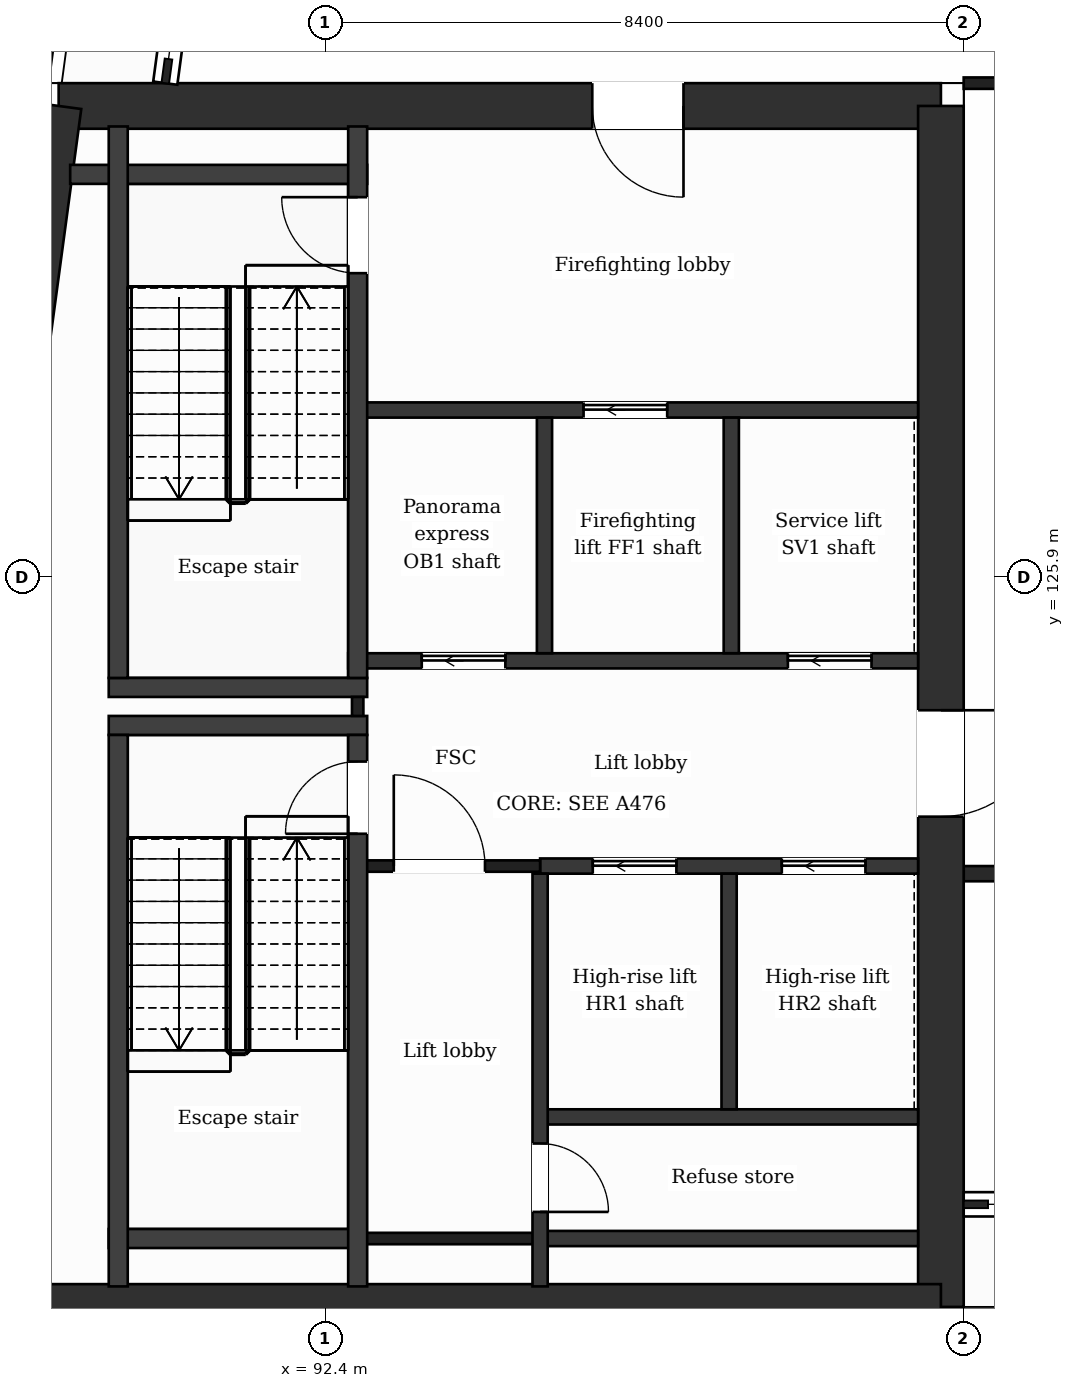
"""IFC4 building model, lengths in metres.
Left out: names, types, materials, properties, quantities, classifications, styles, units other than length and angle.
Written with IfcOpenShell. Run it as: python <this file> out.ifc"""

import sys

from ifc_helpers import new_model, si_unit, direction, frame, frame_2d, origin, place, context, subcontext, project, spatial, rectangle, extrude, element, fill, save


model = new_model("IFC4")
c1 = context("Model", 3, precision=1e-05, world=origin(), true_north=direction((0.0, 1.0)))
c2 = subcontext(c1, "Body", "Model", "MODEL_VIEW")
j1 = project(units=[si_unit("LENGTHUNIT", "METRE"), si_unit("PLANEANGLEUNIT", "RADIAN")], contexts=[c1])
p1 = place(None, origin())
s1 = spatial("IfcSite", under=j1, at=p1, CompositionType="ELEMENT")
p2 = place(p1, origin())
s2 = spatial("IfcBuilding", under=s1, at=p2, CompositionType="ELEMENT")
p3 = place(p2, frame((0.0, 0.0, 307.9)))
s3 = spatial("IfcBuildingStorey", under=s2, at=p3, CompositionType="ELEMENT", Elevation=307.9)
p4 = place(p3, frame((88.893, 132.1, 0.0), z_axis=(0.0, 0.0, 1.0), x_axis=(1.0, 0.0, 0.0)))
e1 = element("IfcWall", 1, at=p4, inside=s3, PredefinedType="SHEAR", context=c2, shape_type="SweptSolid", body=[
    extrude(rectangle(XDim=11.607, YDim=0.6, at=frame_2d((5.803, 0.0))), origin(), (0.0, 0.0, 1.0), 7.5),
])
p5 = place(p4, frame((7.021, 0.0, 0.0)))
e2 = element("IfcOpeningElement", 2, at=p5, cuts=e1, PredefinedType="OPENING", context=c2, shape_type="SweptSolid", body=[
    extrude(rectangle(XDim=1.2, YDim=2.1, at=frame_2d((0.6, 1.05))), frame((0.0, 0.31, 0.0), z_axis=(0.0, -1.0, 0.0), x_axis=(1.0, 0.0, 0.0)), (0.0, 0.0, 1.0), 0.62),
])
p6 = place(p3, frame((100.5, 132.1, 0.0), z_axis=(0.0, 0.0, 1.0), x_axis=(0.0, -1.0, 0.0)))
e3 = element("IfcWall", 3, at=p6, inside=s3, PredefinedType="SHEAR", context=c2, shape_type="SweptSolid", body=[
    extrude(rectangle(XDim=15.8, YDim=0.6, at=frame_2d((7.9, 0.0))), origin(), (0.0, 0.0, 1.0), 7.5),
])
p7 = place(p6, frame((7.95, 0.0, 0.0)))
e4 = element("IfcOpeningElement", 4, at=p7, cuts=e3, PredefinedType="OPENING", context=c2, shape_type="SweptSolid", body=[
    extrude(rectangle(XDim=1.4, YDim=2.1, at=frame_2d((0.7, 1.05))), frame((0.0, 0.31, 0.0), z_axis=(0.0, -1.0, 0.0), x_axis=(1.0, 0.0, 0.0)), (0.0, 0.0, 1.0), 0.62),
])
p8 = place(p3, frame((100.5, 116.3, 0.0), z_axis=(0.0, 0.0, 1.0), x_axis=(-1.0, 0.0, 0.0)))
e5 = element("IfcWall", 5, at=p8, inside=s3, PredefinedType="SHEAR", context=c2, shape_type="SweptSolid", body=[
    extrude(rectangle(XDim=13.734, YDim=0.6, at=frame_2d((6.867, 0.0))), origin(), (0.0, 0.0, 1.0), 7.5),
])
p9 = place(p3, frame((86.766, 116.3, 0.0), z_axis=(0.0, 0.0, 1.0), x_axis=(0.13341345841, 0.991060466932, 0.0)))
e6 = element("IfcWall", 6, at=p9, inside=s3, PredefinedType="SHEAR", context=c2, shape_type="SweptSolid", body=[
    extrude(rectangle(XDim=15.943, YDim=0.6, at=frame_2d((7.971, 0.0))), origin(), (0.0, 0.0, 1.0), 7.5),
])
p10 = place(p3, frame((95.227, 117.2, 0.0), z_axis=(0.0, 0.0, 1.0), x_axis=(1.0, 0.0, 0.0)))
e7 = element("IfcWall", 7, at=p10, inside=s3, PredefinedType="PARTITIONING", context=c2, shape_type="SweptSolid", body=[
    extrude(rectangle(XDim=4.973, YDim=0.2, at=frame_2d((2.486, 0.0))), origin(), (0.0, 0.0, 1.0), 7.05),
])
p11 = place(p3, frame((92.827, 117.2, 0.0), z_axis=(0.0, 0.0, 1.0), x_axis=(1.0, 0.0, 0.0)))
e8 = element("IfcWall", 8, at=p11, inside=s3, PredefinedType="PARTITIONING", context=c2, shape_type="SweptSolid", body=[
    extrude(rectangle(XDim=2.4, YDim=0.15, at=frame_2d((1.2, 0.0))), origin(), (0.0, 0.0, 1.0), 7.05),
])
p12 = place(p3, frame((89.552, 117.2, 0.0), z_axis=(0.0, 0.0, 1.0), x_axis=(1.0, 0.0, 0.0)))
e9 = element("IfcWall", 9, at=p12, inside=s3, PredefinedType="PARTITIONING", context=c2, shape_type="SweptSolid", body=[
    extrude(rectangle(XDim=3.275, YDim=0.25, at=frame_2d((1.637, 0.0))), origin(), (0.0, 0.0, 1.0), 7.05),
])
p13 = place(p3, frame((95.227, 118.8, 0.0), z_axis=(0.0, 0.0, 1.0), x_axis=(1.0, 0.0, 0.0)))
e10 = element("IfcWall", 10, at=p13, inside=s3, PredefinedType="PARTITIONING", context=c2, shape_type="SweptSolid", body=[
    extrude(rectangle(XDim=4.973, YDim=0.2, at=frame_2d((2.486, 0.0))), origin(), (0.0, 0.0, 1.0), 7.05),
])
p14 = place(p3, frame((100.8, 122.0, 0.0), z_axis=(0.0, 0.0, 1.0), x_axis=(1.0, 0.0, 0.0)))
e11 = element("IfcWall", 11, at=p14, inside=s3, PredefinedType="PARTITIONING", context=c2, shape_type="SweptSolid", body=[
    extrude(rectangle(XDim=8.5, YDim=0.2, at=frame_2d((4.25, 0.0))), origin(), (0.0, 0.0, 1.0), 7.05),
])
p15 = place(p3, frame((95.227, 122.1, 0.0), z_axis=(0.0, 0.0, 1.0), x_axis=(1.0, 0.0, 0.0)))
e12 = element("IfcWall", 12, at=p15, inside=s3, PredefinedType="PARTITIONING", context=c2, shape_type="SweptSolid", body=[
    extrude(rectangle(XDim=4.973, YDim=0.2, at=frame_2d((2.486, 0.0))), origin(), (0.0, 0.0, 1.0), 7.05),
])
p16 = place(p15, frame((0.693, 0.0, 0.0)))
e13 = element("IfcOpeningElement", 13, at=p16, cuts=e12, PredefinedType="OPENING", context=c2, shape_type="SweptSolid", body=[
    extrude(rectangle(XDim=1.1, YDim=2.1, at=frame_2d((0.55, 1.05))), frame((0.0, 0.11, 0.0), z_axis=(0.0, -1.0, 0.0), x_axis=(1.0, 0.0, 0.0)), (0.0, 0.0, 1.0), 0.22),
])
p17 = place(p15, frame((3.18, 0.0, 0.0)))
e14 = element("IfcOpeningElement", 14, at=p17, cuts=e12, PredefinedType="OPENING", context=c2, shape_type="SweptSolid", body=[
    extrude(rectangle(XDim=1.1, YDim=2.1, at=frame_2d((0.55, 1.05))), frame((0.0, 0.11, 0.0), z_axis=(0.0, -1.0, 0.0), x_axis=(1.0, 0.0, 0.0)), (0.0, 0.0, 1.0), 0.22),
])
p18 = place(p3, frame((92.827, 122.1, 0.0), z_axis=(0.0, 0.0, 1.0), x_axis=(1.0, 0.0, 0.0)))
e15 = element("IfcWall", 15, at=p18, inside=s3, PredefinedType="PARTITIONING", context=c2, shape_type="SweptSolid", body=[
    extrude(rectangle(XDim=2.4, YDim=0.15, at=frame_2d((1.2, 0.0))), origin(), (0.0, 0.0, 1.0), 7.05),
])
p19 = place(p18, frame((0.475, 0.0, 0.0)))
e16 = element("IfcOpeningElement", 16, at=p19, cuts=e15, PredefinedType="OPENING", context=c2, shape_type="SweptSolid", body=[
    extrude(rectangle(XDim=1.2, YDim=2.1, at=frame_2d((0.6, 1.05))), frame((0.0, 0.085, 0.0), z_axis=(0.0, -1.0, 0.0), x_axis=(1.0, 0.0, 0.0)), (0.0, 0.0, 1.0), 0.17),
])
for number, where, z_axis, x_axis in (
    (17, (89.552, 123.95, 0.0), (0.0, 0.0, 1.0), (1.0, 0.0, 0.0)),
    (18, (89.552, 124.45, 0.0), (0.0, 0.0, 1.0), (1.0, 0.0, 0.0)),
):
    element("IfcWall", number, at=place(p3, frame(where, z_axis=z_axis, x_axis=x_axis)), inside=s3, PredefinedType="PARTITIONING", context=c2, shape_type="SweptSolid", body=[
        extrude(rectangle(XDim=3.4, YDim=0.25, at=frame_2d((1.7, 0.0))), origin(), (0.0, 0.0, 1.0), 7.05),
    ])
p20 = place(p3, frame((92.702, 124.8, 0.0), z_axis=(0.0, 0.0, 1.0), x_axis=(1.0, 0.0, 0.0)))
e19 = element("IfcWall", 19, at=p20, inside=s3, PredefinedType="PARTITIONING", context=c2, shape_type="SweptSolid", body=[
    extrude(rectangle(XDim=7.498, YDim=0.2, at=frame_2d((3.749, 0.0))), origin(), (0.0, 0.0, 1.0), 7.05),
])
p21 = place(p20, frame((0.968, 0.0, 0.0)))
e20 = element("IfcOpeningElement", 20, at=p21, cuts=e19, PredefinedType="OPENING", context=c2, shape_type="SweptSolid", body=[
    extrude(rectangle(XDim=1.1, YDim=2.1, at=frame_2d((0.55, 1.05))), frame((0.0, 0.11, 0.0), z_axis=(0.0, -1.0, 0.0), x_axis=(1.0, 0.0, 0.0)), (0.0, 0.0, 1.0), 0.22),
])
p22 = place(p20, frame((5.785, 0.0, 0.0)))
e21 = element("IfcOpeningElement", 21, at=p22, cuts=e19, PredefinedType="OPENING", context=c2, shape_type="SweptSolid", body=[
    extrude(rectangle(XDim=1.1, YDim=2.1, at=frame_2d((0.55, 1.05))), frame((0.0, 0.11, 0.0), z_axis=(0.0, -1.0, 0.0), x_axis=(1.0, 0.0, 0.0)), (0.0, 0.0, 1.0), 0.22),
])
p23 = place(p3, frame((92.827, 128.1, 0.0), z_axis=(0.0, 0.0, 1.0), x_axis=(1.0, 0.0, 0.0)))
e22 = element("IfcWall", 22, at=p23, inside=s3, PredefinedType="PARTITIONING", context=c2, shape_type="SweptSolid", body=[
    extrude(rectangle(XDim=7.373, YDim=0.2, at=frame_2d((3.687, 0.0))), origin(), (0.0, 0.0, 1.0), 7.05),
])
p24 = place(p23, frame((2.972, 0.0, 0.0)))
e23 = element("IfcOpeningElement", 23, at=p24, cuts=e22, PredefinedType="OPENING", context=c2, shape_type="SweptSolid", body=[
    extrude(rectangle(XDim=1.1, YDim=2.1, at=frame_2d((0.55, 1.05))), frame((0.0, 0.11, 0.0), z_axis=(0.0, -1.0, 0.0), x_axis=(1.0, 0.0, 0.0)), (0.0, 0.0, 1.0), 0.22),
])
p25 = place(p3, frame((89.045, 131.2, 0.0), z_axis=(0.0, 0.0, 1.0), x_axis=(1.0, 0.0, 0.0)))
e24 = element("IfcWall", 24, at=p25, inside=s3, PredefinedType="PARTITIONING", context=c2, shape_type="SweptSolid", body=[
    extrude(rectangle(XDim=3.907, YDim=0.25, at=frame_2d((1.954, 0.0))), origin(), (0.0, 0.0, 1.0), 7.05),
])
p26 = place(p3, frame((100.8, 132.4, 0.0), z_axis=(0.0, 0.0, 1.0), x_axis=(1.0, 0.0, 0.0)))
e25 = element("IfcWall", 25, at=p26, inside=s3, PredefinedType="PARTITIONING", context=c2, shape_type="SweptSolid", body=[
    extrude(rectangle(XDim=25.2, YDim=0.15, at=frame_2d((12.6, 0.0))), origin(), (0.0, 0.0, 1.0), 7.05),
])
p27 = place(p26, frame((9.28, 0.0, 0.0)))
e26 = element("IfcOpeningElement", 26, at=p27, cuts=e25, PredefinedType="OPENING", context=c2, shape_type="SweptSolid", body=[
    extrude(rectangle(XDim=2.4, YDim=2.1, at=frame_2d((1.2, 1.05))), frame((0.0, 0.085, 0.0), z_axis=(0.0, -1.0, 0.0), x_axis=(1.0, 0.0, 0.0)), (0.0, 0.0, 1.0), 0.17),
])
p28 = place(p26, frame((13.52, 0.0, 0.0)))
e27 = element("IfcOpeningElement", 27, at=p28, cuts=e25, PredefinedType="OPENING", context=c2, shape_type="SweptSolid", body=[
    extrude(rectangle(XDim=2.4, YDim=2.1, at=frame_2d((1.2, 1.05))), frame((0.0, 0.085, 0.0), z_axis=(0.0, -1.0, 0.0), x_axis=(1.0, 0.0, 0.0)), (0.0, 0.0, 1.0), 0.17),
])
p29 = place(p3, frame((89.677, 116.57, 0.0), z_axis=(0.0, 0.0, 1.0), x_axis=(0.0, 1.0, 0.0)))
e28 = element("IfcWall", 28, at=p29, inside=s3, PredefinedType="PARTITIONING", context=c2, shape_type="SweptSolid", body=[
    extrude(rectangle(XDim=7.255, YDim=0.25, at=frame_2d((3.627, 0.0))), origin(), (0.0, 0.0, 1.0), 7.05),
])
p30 = place(p3, frame((89.677, 124.575, 0.0), z_axis=(0.0, 0.0, 1.0), x_axis=(0.0, 1.0, 0.0)))
e29 = element("IfcWall", 29, at=p30, inside=s3, PredefinedType="PARTITIONING", context=c2, shape_type="SweptSolid", body=[
    extrude(rectangle(XDim=7.255, YDim=0.25, at=frame_2d((3.627, 0.0))), origin(), (0.0, 0.0, 1.0), 7.05),
])
p31 = place(p3, frame((92.827, 124.075, 0.0), z_axis=(0.0, 0.0, 1.0), x_axis=(0.0, 1.0, 0.0)))
e30 = element("IfcWall", 30, at=p31, inside=s3, PredefinedType="PARTITIONING", context=c2, shape_type="SweptSolid", body=[
    extrude(rectangle(XDim=0.25, YDim=0.15, at=frame_2d((0.125, 0.0))), origin(), (0.0, 0.0, 1.0), 7.05),
])
p32 = place(p3, frame((92.827, 116.57, 0.0), z_axis=(0.0, 0.0, 1.0), x_axis=(0.0, 1.0, 0.0)))
e31 = element("IfcWall", 31, at=p32, inside=s3, PredefinedType="PARTITIONING", context=c2, shape_type="SweptSolid", body=[
    extrude(rectangle(XDim=7.255, YDim=0.25, at=frame_2d((3.627, 0.0))), origin(), (0.0, 0.0, 1.0), 7.05),
])
p33 = place(p32, frame((5.955, 0.0, 0.0)))
e32 = element("IfcOpeningElement", 32, at=p33, cuts=e31, PredefinedType="OPENING", context=c2, shape_type="SweptSolid", body=[
    extrude(rectangle(XDim=0.95, YDim=2.1, at=frame_2d((0.475, 1.05))), frame((0.0, 0.135, 0.0), z_axis=(0.0, -1.0, 0.0), x_axis=(1.0, 0.0, 0.0)), (0.0, 0.0, 1.0), 0.27),
])
p34 = place(p3, frame((92.827, 124.575, 0.0), z_axis=(0.0, 0.0, 1.0), x_axis=(0.0, 1.0, 0.0)))
e33 = element("IfcWall", 33, at=p34, inside=s3, PredefinedType="PARTITIONING", context=c2, shape_type="SweptSolid", body=[
    extrude(rectangle(XDim=7.255, YDim=0.25, at=frame_2d((3.627, 0.0))), origin(), (0.0, 0.0, 1.0), 7.05),
])
p35 = place(p34, frame((5.325, 0.0, 0.0)))
e34 = element("IfcOpeningElement", 34, at=p35, cuts=e33, PredefinedType="OPENING", context=c2, shape_type="SweptSolid", body=[
    extrude(rectangle(XDim=1.0, YDim=2.1, at=frame_2d((0.5, 1.05))), frame((0.0, 0.135, 0.0), z_axis=(0.0, -1.0, 0.0), x_axis=(1.0, 0.0, 0.0)), (0.0, 0.0, 1.0), 0.27),
])
p36 = place(p3, frame((95.227, 116.57, 0.0), z_axis=(0.0, 0.0, 1.0), x_axis=(0.0, 1.0, 0.0)))
e35 = element("IfcWall", 35, at=p36, inside=s3, PredefinedType="PARTITIONING", context=c2, shape_type="SweptSolid", body=[
    extrude(rectangle(XDim=5.43, YDim=0.2, at=frame_2d((2.715, 0.0))), origin(), (0.0, 0.0, 1.0), 7.05),
])
p37 = place(p36, frame((0.98, 0.0, 0.0)))
e36 = element("IfcOpeningElement", 36, at=p37, cuts=e35, PredefinedType="OPENING", context=c2, shape_type="SweptSolid", body=[
    extrude(rectangle(XDim=0.9, YDim=2.1, at=frame_2d((0.45, 1.05))), frame((0.0, 0.11, 0.0), z_axis=(0.0, -1.0, 0.0), x_axis=(1.0, 0.0, 0.0)), (0.0, 0.0, 1.0), 0.22),
])
for number, where, z_axis, x_axis in (
    (37, (95.285, 124.9, 0.0), (0.0, 0.0, 1.0), (0.0, 1.0, 0.0)),
    (38, (97.713, 118.9, 0.0), (0.0, 0.0, 1.0), (0.0, 1.0, 0.0)),
    (39, (97.742, 124.9, 0.0), (0.0, 0.0, 1.0), (0.0, 1.0, 0.0)),
):
    element("IfcWall", number, at=place(p3, frame(where, z_axis=z_axis, x_axis=x_axis)), inside=s3, PredefinedType="PARTITIONING", context=c2, shape_type="SweptSolid", body=[
        extrude(rectangle(XDim=3.1, YDim=0.2, at=frame_2d((1.55, 0.0))), origin(), (0.0, 0.0, 1.0), 7.05),
    ])
p38 = place(p19, origin())
e40 = element("IfcDoor", 40, at=p38, inside=s3, OperationType="SINGLE_SWING_LEFT", PredefinedType="DOOR", context=c2, shape_type="SweptSolid", body=[
    extrude(rectangle(XDim=1.2, YDim=2.1, at=frame_2d((0.6, 1.05))), frame((0.0, 0.025, 0.0), z_axis=(0.0, -1.0, 0.0), x_axis=(1.0, 0.0, 0.0)), (0.0, 0.0, 1.0), 0.05),
])
fill(e16, e40)
p39 = place(p16, origin())
e41 = element("IfcDoor", 41, at=p39, inside=s3, OperationType="SLIDING_TO_LEFT", PredefinedType="DOOR", context=c2, shape_type="SweptSolid", body=[
    extrude(rectangle(XDim=1.1, YDim=2.1, at=frame_2d((0.55, 1.05))), frame((0.0, 0.025, 0.0), z_axis=(0.0, -1.0, 0.0), x_axis=(1.0, 0.0, 0.0)), (0.0, 0.0, 1.0), 0.05),
])
fill(e13, e41)
p40 = place(p17, origin())
e42 = element("IfcDoor", 42, at=p40, inside=s3, OperationType="SLIDING_TO_LEFT", PredefinedType="DOOR", context=c2, shape_type="SweptSolid", body=[
    extrude(rectangle(XDim=1.1, YDim=2.1, at=frame_2d((0.55, 1.05))), frame((0.0, 0.025, 0.0), z_axis=(0.0, -1.0, 0.0), x_axis=(1.0, 0.0, 0.0)), (0.0, 0.0, 1.0), 0.05),
])
fill(e14, e42)
p41 = place(p21, origin())
e43 = element("IfcDoor", 43, at=p41, inside=s3, OperationType="SLIDING_TO_LEFT", PredefinedType="DOOR", context=c2, shape_type="SweptSolid", body=[
    extrude(rectangle(XDim=1.1, YDim=2.1, at=frame_2d((0.55, 1.05))), frame((0.0, 0.025, 0.0), z_axis=(0.0, -1.0, 0.0), x_axis=(1.0, 0.0, 0.0)), (0.0, 0.0, 1.0), 0.05),
])
fill(e20, e43)
p42 = place(p24, origin())
e44 = element("IfcDoor", 44, at=p42, inside=s3, OperationType="SLIDING_TO_LEFT", PredefinedType="DOOR", context=c2, shape_type="SweptSolid", body=[
    extrude(rectangle(XDim=1.1, YDim=2.1, at=frame_2d((0.55, 1.05))), frame((0.0, 0.025, 0.0), z_axis=(0.0, -1.0, 0.0), x_axis=(1.0, 0.0, 0.0)), (0.0, 0.0, 1.0), 0.05),
])
fill(e23, e44)
p43 = place(p22, origin())
e45 = element("IfcDoor", 45, at=p43, inside=s3, OperationType="SLIDING_TO_LEFT", PredefinedType="DOOR", context=c2, shape_type="SweptSolid", body=[
    extrude(rectangle(XDim=1.1, YDim=2.1, at=frame_2d((0.55, 1.05))), frame((0.0, 0.025, 0.0), z_axis=(0.0, -1.0, 0.0), x_axis=(1.0, 0.0, 0.0)), (0.0, 0.0, 1.0), 0.05),
])
fill(e21, e45)
p44 = place(p33, origin())
e46 = element("IfcDoor", 46, at=p44, inside=s3, OperationType="SINGLE_SWING_LEFT", PredefinedType="DOOR", context=c2, shape_type="SweptSolid", body=[
    extrude(rectangle(XDim=0.95, YDim=2.1, at=frame_2d((0.475, 1.05))), frame((0.0, 0.025, 0.0), z_axis=(0.0, -1.0, 0.0), x_axis=(1.0, 0.0, 0.0)), (0.0, 0.0, 1.0), 0.05),
])
fill(e32, e46)
p45 = place(p35, origin())
e47 = element("IfcDoor", 47, at=p45, inside=s3, OperationType="SINGLE_SWING_RIGHT", PredefinedType="DOOR", context=c2, shape_type="SweptSolid", body=[
    extrude(rectangle(XDim=1.0, YDim=2.1, at=frame_2d((0.5, 1.05))), frame((0.0, 0.025, 0.0), z_axis=(0.0, -1.0, 0.0), x_axis=(1.0, 0.0, 0.0)), (0.0, 0.0, 1.0), 0.05),
])
fill(e34, e47)
p46 = place(p37, origin())
e48 = element("IfcDoor", 48, at=p46, inside=s3, OperationType="SINGLE_SWING_LEFT", PredefinedType="DOOR", context=c2, shape_type="SweptSolid", body=[
    extrude(rectangle(XDim=0.9, YDim=2.1, at=frame_2d((0.45, 1.05))), frame((0.0, 0.025, 0.0), z_axis=(0.0, -1.0, 0.0), x_axis=(1.0, 0.0, 0.0)), (0.0, 0.0, 1.0), 0.05),
])
fill(e36, e48)
p47 = place(p5, origin())
e49 = element("IfcDoor", 49, at=p47, inside=s3, OperationType="SINGLE_SWING_RIGHT", PredefinedType="DOOR", context=c2, shape_type="SweptSolid", body=[
    extrude(rectangle(XDim=1.2, YDim=2.1, at=frame_2d((0.6, 1.05))), frame((0.0, 0.025, 0.0), z_axis=(0.0, -1.0, 0.0), x_axis=(1.0, 0.0, 0.0)), (0.0, 0.0, 1.0), 0.05),
])
fill(e2, e49)
p48 = place(p7, origin())
e50 = element("IfcDoor", 50, at=p48, inside=s3, OperationType="SINGLE_SWING_LEFT", PredefinedType="DOOR", context=c2, shape_type="SweptSolid", body=[
    extrude(rectangle(XDim=1.4, YDim=2.1, at=frame_2d((0.7, 1.05))), frame((0.0, 0.025, 0.0), z_axis=(0.0, -1.0, 0.0), x_axis=(1.0, 0.0, 0.0)), (0.0, 0.0, 1.0), 0.05),
])
fill(e4, e50)
save(model, sys.argv[1])
